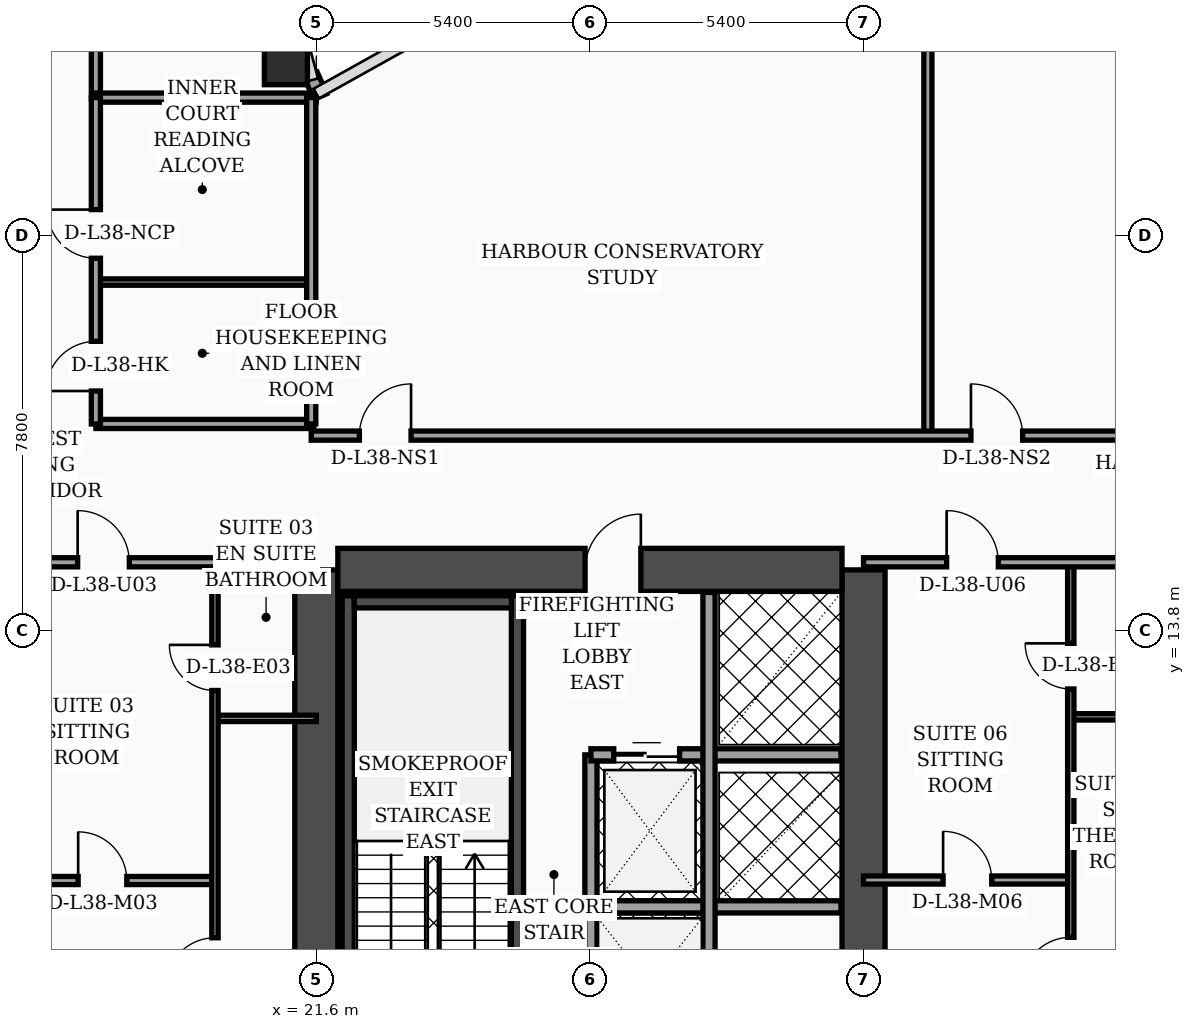
"""IFC4 building model, lengths in metres.
Left out: names, types, materials, properties, quantities, classifications, styles, units other than length and angle.
Written with IfcOpenShell. Run it as: python <this file> out.ifc"""

import sys

from ifc_helpers import new_model, si_unit, direction, frame, frame_2d, origin, origin_2d, place, context, subcontext, project, spatial, rectangle, hollow_rectangle, extrude, element, fill, save


model = new_model("IFC4")
c1 = context("Model", 3, precision=1e-05, world=origin(), true_north=direction((0.0, 1.0)))
c2 = subcontext(c1, "Body", "Model", "MODEL_VIEW")
j1 = project(units=[si_unit("LENGTHUNIT", "METRE"), si_unit("PLANEANGLEUNIT", "RADIAN")], contexts=[c1])
p1 = place(None, origin())
s1 = spatial("IfcSite", under=j1, at=p1, CompositionType="ELEMENT")
p2 = place(p1, origin())
s2 = spatial("IfcBuilding", under=s1, at=p2, CompositionType="ELEMENT")
p3 = place(p2, frame((0.0, 0.0, 156.1)))
s3 = spatial("IfcBuildingStorey", under=s2, at=p3, CompositionType="ELEMENT", Elevation=156.1)
for number, where, z_axis, x_axis in (
    (1, (21.6, 4.6, 0.0), (0.0, 0.0, 1.0), (0.0, 1.0, 0.0)),
    (2, (32.4, 4.6, 0.0), (0.0, 0.0, 1.0), (0.0, 1.0, 0.0)),
):
    element("IfcWall", number, at=place(p3, frame(where, z_axis=z_axis, x_axis=x_axis)), inside=s3, PredefinedType="SHEAR", context=c2, shape_type="SweptSolid", body=[
        extrude(rectangle(XDim=10.4, YDim=0.85, at=frame_2d((5.2, 0.0))), origin(), (0.0, 0.0, 1.0), 3.56),
    ])
p4 = place(p3, frame((22.025, 15.0, 0.0), z_axis=(0.0, 0.0, 1.0), x_axis=(1.0, 0.0, 0.0)))
e3 = element("IfcWall", 3, at=p4, inside=s3, PredefinedType="SHEAR", context=c2, shape_type="SweptSolid", body=[
    extrude(rectangle(XDim=9.95, YDim=0.85, at=frame_2d((4.975, 0.0))), origin(), (0.0, 0.0, 1.0), 3.56),
])
p5 = place(p4, frame((4.88, 0.0, 0.0)))
e4 = element("IfcOpeningElement", 4, at=p5, cuts=e3, PredefinedType="OPENING", context=c2, shape_type="SweptSolid", body=[
    extrude(rectangle(XDim=1.1, YDim=2.2, at=frame_2d((0.55, 1.1))), frame((0.0, 0.435, 0.0), z_axis=(0.0, -1.0, 0.0), x_axis=(1.0, 0.0, 0.0)), (0.0, 0.0, 1.0), 0.87),
])
p6 = place(p3, frame((22.23, 5.025, 0.0), z_axis=(0.0, 0.0, 1.0), x_axis=(0.0, 1.0, 0.0)))
e5 = element("IfcWall", 5, at=p6, inside=s3, PredefinedType="SOLIDWALL", context=c2, shape_type="SweptSolid", body=[
    extrude(rectangle(XDim=9.465, YDim=0.24, at=frame_2d((4.732, 0.0))), origin(), (0.0, 0.0, 1.0), 3.56),
])
p7 = place(p3, frame((25.57, 5.025, 0.0), z_axis=(0.0, 0.0, 1.0), x_axis=(0.0, 1.0, 0.0)))
e6 = element("IfcWall", 6, at=p7, inside=s3, PredefinedType="SOLIDWALL", context=c2, shape_type="SweptSolid", body=[
    extrude(rectangle(XDim=9.465, YDim=0.24, at=frame_2d((4.732, 0.0))), origin(), (0.0, 0.0, 1.0), 3.56),
])
p8 = place(p7, frame((0.35, 0.0, 0.0)))
e7 = element("IfcOpeningElement", 7, at=p8, cuts=e6, PredefinedType="OPENING", context=c2, shape_type="SweptSolid", body=[
    extrude(rectangle(XDim=1.15, YDim=2.2, at=frame_2d((0.575, 1.1))), frame((0.0, 0.13, 0.0), z_axis=(0.0, -1.0, 0.0), x_axis=(1.0, 0.0, 0.0)), (0.0, 0.0, 1.0), 0.26),
])
p9 = place(p3, frame((22.35, 14.37, 0.0), z_axis=(0.0, 0.0, 1.0), x_axis=(1.0, 0.0, 0.0)))
e8 = element("IfcWall", 8, at=p9, inside=s3, PredefinedType="SOLIDWALL", context=c2, shape_type="SweptSolid", body=[
    extrude(rectangle(XDim=3.1, YDim=0.24, at=frame_2d((1.55, 0.0))), origin(), (0.0, 0.0, 1.0), 3.56),
])
p10 = place(p3, frame((21.0, 25.0, 0.0), z_axis=(0.0, 0.0, 1.0), x_axis=(1.0, 0.0, 0.0)))
e9 = element("IfcColumn", 9, at=p10, inside=s3, PredefinedType="COLUMN", context=c2, shape_type="SweptSolid", body=[
    extrude(hollow_rectangle(XDim=0.85, YDim=0.85, WallThickness=0.036, at=origin_2d()), origin(), (0.0, 0.0, 1.0), 3.56),
])
p11 = place(p3, frame((21.68, 24.34, 0.0), z_axis=(0.0, 0.0, 1.0), x_axis=(-0.40758134973, 0.913168901875, 0.0)))
e10 = element("IfcWall", 10, at=p11, inside=s3, PredefinedType="SOLIDWALL", context=c2, shape_type="SweptSolid", body=[
    extrude(rectangle(XDim=0.471, YDim=0.28, at=frame_2d((0.235, 0.0))), origin(), (0.0, 0.0, 1.0), 3.56),
])
p12 = place(p3, frame((27.02, 5.045, 0.0), z_axis=(0.0, 0.0, 1.0), x_axis=(0.0, 1.0, 0.0)))
e11 = element("IfcWall", 11, at=p12, inside=s3, PredefinedType="SOLIDWALL", context=c2, shape_type="SweptSolid", body=[
    extrude(rectangle(XDim=6.305, YDim=0.24, at=frame_2d((3.153, 0.0))), origin(), (0.0, 0.0, 1.0), 3.56),
])
p13 = place(p3, frame((27.02, 11.35, 0.0), z_axis=(0.0, 0.0, 1.0), x_axis=(1.0, 0.0, 0.0)))
e12 = element("IfcWall", 12, at=p13, inside=s3, PredefinedType="SOLIDWALL", context=c2, shape_type="SweptSolid", body=[
    extrude(rectangle(XDim=4.935, YDim=0.24, at=frame_2d((2.468, 0.0))), origin(), (0.0, 0.0, 1.0), 3.56),
])
p14 = place(p13, frame((0.45, 0.0, 0.0)))
e13 = element("IfcOpeningElement", 13, at=p14, cuts=e12, PredefinedType="OPENING", context=c2, shape_type="SweptSolid", body=[
    extrude(rectangle(XDim=1.3, YDim=2.35, at=frame_2d((0.65, 1.175))), frame((0.0, 0.13, 0.0), z_axis=(0.0, -1.0, 0.0), x_axis=(1.0, 0.0, 0.0)), (0.0, 0.0, 1.0), 0.26),
])
p15 = place(p3, frame((27.02, 8.35, 0.0), z_axis=(0.0, 0.0, 1.0), x_axis=(1.0, 0.0, 0.0)))
e14 = element("IfcWall", 14, at=p15, inside=s3, PredefinedType="SOLIDWALL", context=c2, shape_type="SweptSolid", body=[
    extrude(rectangle(XDim=4.935, YDim=0.24, at=frame_2d((2.468, 0.0))), origin(), (0.0, 0.0, 1.0), 3.56),
])
p16 = place(p3, frame((29.35, 5.045, 0.0), z_axis=(0.0, 0.0, 1.0), x_axis=(0.0, 1.0, 0.0)))
e15 = element("IfcWall", 15, at=p16, inside=s3, PredefinedType="SOLIDWALL", context=c2, shape_type="SweptSolid", body=[
    extrude(rectangle(XDim=9.51, YDim=0.24, at=frame_2d((4.755, 0.0))), origin(), (0.0, 0.0, 1.0), 3.56),
])
p17 = place(p16, frame((0.55, 0.0, 0.0)))
e16 = element("IfcOpeningElement", 16, at=p17, cuts=e15, PredefinedType="OPENING", context=c2, shape_type="SweptSolid", body=[
    extrude(rectangle(XDim=1.3, YDim=2.35, at=frame_2d((0.65, 1.175))), frame((0.0, 0.13, 0.0), z_axis=(0.0, -1.0, 0.0), x_axis=(1.0, 0.0, 0.0)), (0.0, 0.0, 1.0), 0.26),
])
p18 = place(p3, frame((19.6, 12.07, 0.0), z_axis=(0.0, 0.0, 1.0), x_axis=(1.0, 0.0, 0.0)))
e17 = element("IfcWall", 17, at=p18, inside=s3, PredefinedType="PARTITIONING", context=c2, shape_type="SweptSolid", body=[
    extrude(rectangle(XDim=2.0, YDim=0.125, at=frame_2d((1.0, 0.0))), origin(), (0.0, 0.0, 1.0), 3.56),
])
p19 = place(p3, frame((15.15, 8.87, 0.0), z_axis=(0.0, 0.0, 1.0), x_axis=(1.0, 0.0, 0.0)))
e18 = element("IfcWall", 18, at=p19, inside=s3, PredefinedType="PARTITIONING", context=c2, shape_type="SweptSolid", body=[
    extrude(rectangle(XDim=4.45, YDim=0.16, at=frame_2d((2.225, 0.0))), origin(), (0.0, 0.0, 1.0), 3.56),
])
p20 = place(p19, frame((1.75, 0.0, 0.0)))
e19 = element("IfcOpeningElement", 19, at=p20, cuts=e18, PredefinedType="OPENING", context=c2, shape_type="SweptSolid", body=[
    extrude(rectangle(XDim=0.96, YDim=2.2, at=frame_2d((0.48, 1.1))), frame((0.0, 0.09, 0.0), z_axis=(0.0, -1.0, 0.0), x_axis=(1.0, 0.0, 0.0)), (0.0, 0.0, 1.0), 0.18),
])
p21 = place(p3, frame((19.6, 2.44, 0.0), z_axis=(0.0, 0.0, 1.0), x_axis=(0.0, 1.0, 0.0)))
e20 = element("IfcWall", 20, at=p21, inside=s3, PredefinedType="PARTITIONING", context=c2, shape_type="SweptSolid", body=[
    extrude(rectangle(XDim=12.71, YDim=0.125, at=frame_2d((6.355, 0.0))), origin(), (0.0, 0.0, 1.0), 2.49),
])
p22 = place(p21, frame((4.34, 0.0, 0.0)))
e21 = element("IfcOpeningElement", 21, at=p22, cuts=e20, PredefinedType="OPENING", context=c2, shape_type="SweptSolid", body=[
    extrude(rectangle(XDim=0.96, YDim=2.2, at=frame_2d((0.48, 1.1))), frame((0.0, 0.073, 0.0), z_axis=(0.0, -1.0, 0.0), x_axis=(1.0, 0.0, 0.0)), (0.0, 0.0, 1.0), 0.145),
])
p23 = place(p21, frame((10.18, 0.0, 0.0)))
e22 = element("IfcOpeningElement", 22, at=p23, cuts=e20, PredefinedType="OPENING", context=c2, shape_type="SweptSolid", body=[
    extrude(rectangle(XDim=0.9, YDim=2.15, at=frame_2d((0.45, 1.075))), frame((0.0, 0.073, 0.0), z_axis=(0.0, -1.0, 0.0), x_axis=(1.0, 0.0, 0.0)), (0.0, 0.0, 1.0), 0.145),
])
p24 = place(p3, frame((15.15, 15.15, 0.0), z_axis=(0.0, 0.0, 1.0), x_axis=(1.0, 0.0, 0.0)))
e23 = element("IfcWall", 23, at=p24, inside=s3, PredefinedType="PARTITIONING", context=c2, shape_type="SweptSolid", body=[
    extrude(rectangle(XDim=6.45, YDim=0.18, at=frame_2d((3.225, 0.0))), origin(), (0.0, 0.0, 1.0), 2.49),
])
p25 = place(p24, frame((1.74, 0.0, 0.0)))
e24 = element("IfcOpeningElement", 24, at=p25, cuts=e23, PredefinedType="OPENING", context=c2, shape_type="SweptSolid", body=[
    extrude(rectangle(XDim=1.02, YDim=2.2, at=frame_2d((0.51, 1.1))), frame((0.0, 0.1, 0.0), z_axis=(0.0, -1.0, 0.0), x_axis=(1.0, 0.0, 0.0)), (0.0, 0.0, 1.0), 0.2),
])
p26 = place(p3, frame((17.25, 24.3, 0.0), z_axis=(0.0, 0.0, 1.0), x_axis=(0.0, 1.0, 0.0)))
e25 = element("IfcWall", 25, at=p26, inside=s3, PredefinedType="PARTITIONING", context=c2, shape_type="SweptSolid", body=[
    extrude(rectangle(XDim=17.65, YDim=0.18, at=frame_2d((8.825, 0.0))), origin(), (0.0, 0.0, 1.0), 2.94),
])
p27 = place(p3, frame((17.25, 17.88, 0.0), z_axis=(0.0, 0.0, 1.0), x_axis=(1.0, 0.0, 0.0)))
e26 = element("IfcWall", 26, at=p27, inside=s3, PredefinedType="PARTITIONING", context=c2, shape_type="SweptSolid", body=[
    extrude(rectangle(XDim=4.3, YDim=0.18, at=frame_2d((2.15, 0.0))), origin(), (0.0, 0.0, 1.0), 3.56),
])
p28 = place(p3, frame((17.25, 20.68, 0.0), z_axis=(0.0, 0.0, 1.0), x_axis=(1.0, 0.0, 0.0)))
e27 = element("IfcWall", 27, at=p28, inside=s3, PredefinedType="PARTITIONING", context=c2, shape_type="SweptSolid", body=[
    extrude(rectangle(XDim=4.3, YDim=0.125, at=frame_2d((2.15, 0.0))), origin(), (0.0, 0.0, 1.0), 3.56),
])
p29 = place(p3, frame((17.25, 24.32, 0.0), z_axis=(0.0, 0.0, 1.0), x_axis=(1.0, 0.0, 0.0)))
e28 = element("IfcWall", 28, at=p29, inside=s3, PredefinedType="PARTITIONING", context=c2, shape_type="SweptSolid", body=[
    extrude(rectangle(XDim=4.35, YDim=0.18, at=frame_2d((2.175, 0.0))), origin(), (0.0, 0.0, 1.0), 3.56),
])
p30 = place(p3, frame((21.5, 17.88, 0.0), z_axis=(0.0, 0.0, 1.0), x_axis=(0.0, 1.0, 0.0)))
e29 = element("IfcWall", 29, at=p30, inside=s3, PredefinedType="PARTITIONING", context=c2, shape_type="SweptSolid", body=[
    extrude(rectangle(XDim=6.44, YDim=0.18, at=frame_2d((3.22, 0.0))), origin(), (0.0, 0.0, 1.0), 3.09),
])
p31 = place(p3, frame((17.25, 17.88, 0.0), z_axis=(0.0, 0.0, 1.0), x_axis=(0.0, 1.0, 0.0)))
e30 = element("IfcWall", 30, at=p31, inside=s3, PredefinedType="PARTITIONING", context=c2, shape_type="SweptSolid", body=[
    extrude(rectangle(XDim=6.44, YDim=0.18, at=frame_2d((3.22, 0.0))), origin(), (0.0, 0.0, 1.0), 3.09),
])
p32 = place(p31, frame((0.65, 0.0, 0.0)))
e31 = element("IfcOpeningElement", 31, at=p32, cuts=e30, PredefinedType="OPENING", context=c2, shape_type="SweptSolid", body=[
    extrude(rectangle(XDim=0.98, YDim=2.15, at=frame_2d((0.49, 1.075))), frame((0.0, 0.1, 0.0), z_axis=(0.0, -1.0, 0.0), x_axis=(1.0, 0.0, 0.0)), (0.0, 0.0, 1.0), 0.2),
])
p33 = place(p31, frame((3.27, 0.0, 0.0)))
e32 = element("IfcOpeningElement", 32, at=p33, cuts=e30, PredefinedType="OPENING", context=c2, shape_type="SweptSolid", body=[
    extrude(rectangle(XDim=0.96, YDim=2.2, at=frame_2d((0.48, 1.1))), frame((0.0, 0.1, 0.0), z_axis=(0.0, -1.0, 0.0), x_axis=(1.0, 0.0, 0.0)), (0.0, 0.0, 1.0), 0.2),
])
p34 = place(p3, frame((36.49, 12.1, 0.0), z_axis=(0.0, 0.0, 1.0), x_axis=(1.0, 0.0, 0.0)))
e33 = element("IfcWall", 33, at=p34, inside=s3, PredefinedType="PARTITIONING", context=c2, shape_type="SweptSolid", body=[
    extrude(rectangle(XDim=1.93, YDim=0.125, at=frame_2d((0.965, 0.0))), origin(), (0.0, 0.0, 1.0), 3.56),
])
p35 = place(p3, frame((32.4, 8.88, 0.0), z_axis=(0.0, 0.0, 1.0), x_axis=(1.0, 0.0, 0.0)))
e34 = element("IfcWall", 34, at=p35, inside=s3, PredefinedType="PARTITIONING", context=c2, shape_type="SweptSolid", body=[
    extrude(rectangle(XDim=4.09, YDim=0.16, at=frame_2d((2.045, 0.0))), origin(), (0.0, 0.0, 1.0), 2.94),
])
p36 = place(p35, frame((1.57, 0.0, 0.0)))
e35 = element("IfcOpeningElement", 35, at=p36, cuts=e34, PredefinedType="OPENING", context=c2, shape_type="SweptSolid", body=[
    extrude(rectangle(XDim=0.96, YDim=2.2, at=frame_2d((0.48, 1.1))), frame((0.0, 0.09, 0.0), z_axis=(0.0, -1.0, 0.0), x_axis=(1.0, 0.0, 0.0)), (0.0, 0.0, 1.0), 0.18),
])
p37 = place(p3, frame((36.49, 2.44, 0.0), z_axis=(0.0, 0.0, 1.0), x_axis=(0.0, 1.0, 0.0)))
e36 = element("IfcWall", 36, at=p37, inside=s3, PredefinedType="PARTITIONING", context=c2, shape_type="SweptSolid", body=[
    extrude(rectangle(XDim=12.71, YDim=0.125, at=frame_2d((6.355, 0.0))), origin(), (0.0, 0.0, 1.0), 2.94),
])
p38 = place(p37, frame((4.35, 0.0, 0.0)))
e37 = element("IfcOpeningElement", 37, at=p38, cuts=e36, PredefinedType="OPENING", context=c2, shape_type="SweptSolid", body=[
    extrude(rectangle(XDim=0.96, YDim=2.2, at=frame_2d((0.48, 1.1))), frame((0.0, 0.073, 0.0), z_axis=(0.0, -1.0, 0.0), x_axis=(1.0, 0.0, 0.0)), (0.0, 0.0, 1.0), 0.145),
])
p39 = place(p37, frame((10.21, 0.0, 0.0)))
e38 = element("IfcOpeningElement", 38, at=p39, cuts=e36, PredefinedType="OPENING", context=c2, shape_type="SweptSolid", body=[
    extrude(rectangle(XDim=0.9, YDim=2.15, at=frame_2d((0.45, 1.075))), frame((0.0, 0.073, 0.0), z_axis=(0.0, -1.0, 0.0), x_axis=(1.0, 0.0, 0.0)), (0.0, 0.0, 1.0), 0.145),
])
p40 = place(p3, frame((32.4, 15.15, 0.0), z_axis=(0.0, 0.0, 1.0), x_axis=(1.0, 0.0, 0.0)))
e39 = element("IfcWall", 39, at=p40, inside=s3, PredefinedType="PARTITIONING", context=c2, shape_type="SweptSolid", body=[
    extrude(rectangle(XDim=20.2, YDim=0.18, at=frame_2d((10.1, 0.0))), origin(), (0.0, 0.0, 1.0), 2.94),
])
p41 = place(p40, frame((1.64, 0.0, 0.0)))
e40 = element("IfcOpeningElement", 40, at=p41, cuts=e39, PredefinedType="OPENING", context=c2, shape_type="SweptSolid", body=[
    extrude(rectangle(XDim=1.02, YDim=2.2, at=frame_2d((0.51, 1.1))), frame((0.0, 0.1, 0.0), z_axis=(0.0, -1.0, 0.0), x_axis=(1.0, 0.0, 0.0)), (0.0, 0.0, 1.0), 0.2),
])
p42 = place(p40, frame((8.2, 0.0, 0.0)))
e41 = element("IfcOpeningElement", 41, at=p42, cuts=e39, PredefinedType="OPENING", context=c2, shape_type="SweptSolid", body=[
    extrude(rectangle(XDim=1.02, YDim=2.2, at=frame_2d((0.51, 1.1))), frame((0.0, 0.1, 0.0), z_axis=(0.0, -1.0, 0.0), x_axis=(1.0, 0.0, 0.0)), (0.0, 0.0, 1.0), 0.2),
])
p43 = place(p40, frame((15.39, 0.0, 0.0)))
e42 = element("IfcOpeningElement", 42, at=p43, cuts=e39, PredefinedType="OPENING", context=c2, shape_type="SweptSolid", body=[
    extrude(rectangle(XDim=1.02, YDim=2.2, at=frame_2d((0.51, 1.1))), frame((0.0, 0.1, 0.0), z_axis=(0.0, -1.0, 0.0), x_axis=(1.0, 0.0, 0.0)), (0.0, 0.0, 1.0), 0.2),
])
p44 = place(p3, frame((33.67, 17.65, 0.0), z_axis=(0.0, 0.0, 1.0), x_axis=(0.0, 1.0, 0.0)))
e43 = element("IfcWall", 43, at=p44, inside=s3, PredefinedType="PARTITIONING", context=c2, shape_type="SweptSolid", body=[
    extrude(rectangle(XDim=13.56, YDim=0.16, at=frame_2d((6.78, 0.0))), origin(), (0.0, 0.0, 1.0), 2.94),
])
p45 = place(p3, frame((21.5, 17.65, 0.0), z_axis=(0.0, 0.0, 1.0), x_axis=(1.0, 0.0, 0.0)))
e44 = element("IfcWall", 44, at=p45, inside=s3, PredefinedType="PARTITIONING", context=c2, shape_type="SweptSolid", body=[
    extrude(rectangle(XDim=24.25, YDim=0.18, at=frame_2d((12.125, 0.0))), origin(), (0.0, 0.0, 1.0), 2.94),
])
p46 = place(p45, frame((0.95, 0.0, 0.0)))
e45 = element("IfcOpeningElement", 45, at=p46, cuts=e44, PredefinedType="OPENING", context=c2, shape_type="SweptSolid", body=[
    extrude(rectangle(XDim=1.02, YDim=2.2, at=frame_2d((0.51, 1.1))), frame((0.0, 0.1, 0.0), z_axis=(0.0, -1.0, 0.0), x_axis=(1.0, 0.0, 0.0)), (0.0, 0.0, 1.0), 0.2),
])
p47 = place(p45, frame((13.02, 0.0, 0.0)))
e46 = element("IfcOpeningElement", 46, at=p47, cuts=e44, PredefinedType="OPENING", context=c2, shape_type="SweptSolid", body=[
    extrude(rectangle(XDim=1.02, YDim=2.2, at=frame_2d((0.51, 1.1))), frame((0.0, 0.1, 0.0), z_axis=(0.0, -1.0, 0.0), x_axis=(1.0, 0.0, 0.0)), (0.0, 0.0, 1.0), 0.2),
])
p48 = place(p14, origin())
e47 = element("IfcDoor", 47, at=p48, inside=s3, OperationType="DOUBLE_DOOR_SLIDING", PredefinedType="DOOR", context=c2, shape_type="SweptSolid", body=[
    extrude(rectangle(XDim=1.3, YDim=2.35, at=frame_2d((0.65, 1.175))), frame((0.0, 0.025, 0.0), z_axis=(0.0, -1.0, 0.0), x_axis=(1.0, 0.0, 0.0)), (0.0, 0.0, 1.0), 0.05),
])
fill(e13, e47)
p49 = place(p20, origin())
e48 = element("IfcDoor", 48, at=p49, inside=s3, OperationType="SINGLE_SWING_LEFT", PredefinedType="DOOR", context=c2, shape_type="SweptSolid", body=[
    extrude(rectangle(XDim=0.96, YDim=2.2, at=frame_2d((0.48, 1.1))), frame((0.0, 0.025, 0.0), z_axis=(0.0, -1.0, 0.0), x_axis=(1.0, 0.0, 0.0)), (0.0, 0.0, 1.0), 0.05),
])
fill(e19, e48)
p50 = place(p22, origin())
e49 = element("IfcDoor", 49, at=p50, inside=s3, OperationType="SINGLE_SWING_LEFT", PredefinedType="DOOR", context=c2, shape_type="SweptSolid", body=[
    extrude(rectangle(XDim=0.96, YDim=2.2, at=frame_2d((0.48, 1.1))), frame((0.0, 0.025, 0.0), z_axis=(0.0, -1.0, 0.0), x_axis=(1.0, 0.0, 0.0)), (0.0, 0.0, 1.0), 0.05),
])
fill(e21, e49)
p51 = place(p23, origin())
e50 = element("IfcDoor", 50, at=p51, inside=s3, OperationType="SINGLE_SWING_RIGHT", PredefinedType="DOOR", context=c2, shape_type="SweptSolid", body=[
    extrude(rectangle(XDim=0.9, YDim=2.15, at=frame_2d((0.45, 1.075))), frame((0.0, 0.025, 0.0), z_axis=(0.0, -1.0, 0.0), x_axis=(1.0, 0.0, 0.0)), (0.0, 0.0, 1.0), 0.05),
])
fill(e22, e50)
p52 = place(p25, origin())
e51 = element("IfcDoor", 51, at=p52, inside=s3, OperationType="SINGLE_SWING_LEFT", PredefinedType="DOOR", context=c2, shape_type="SweptSolid", body=[
    extrude(rectangle(XDim=1.02, YDim=2.2, at=frame_2d((0.51, 1.1))), frame((0.0, 0.025, 0.0), z_axis=(0.0, -1.0, 0.0), x_axis=(1.0, 0.0, 0.0)), (0.0, 0.0, 1.0), 0.05),
])
fill(e24, e51)
p53 = place(p32, origin())
e52 = element("IfcDoor", 52, at=p53, inside=s3, OperationType="SINGLE_SWING_LEFT", PredefinedType="DOOR", context=c2, shape_type="SweptSolid", body=[
    extrude(rectangle(XDim=0.98, YDim=2.15, at=frame_2d((0.49, 1.075))), frame((0.0, 0.025, 0.0), z_axis=(0.0, -1.0, 0.0), x_axis=(1.0, 0.0, 0.0)), (0.0, 0.0, 1.0), 0.05),
])
fill(e31, e52)
p54 = place(p33, origin())
e53 = element("IfcDoor", 53, at=p54, inside=s3, OperationType="SINGLE_SWING_RIGHT", PredefinedType="DOOR", context=c2, shape_type="SweptSolid", body=[
    extrude(rectangle(XDim=0.96, YDim=2.2, at=frame_2d((0.48, 1.1))), frame((0.0, 0.025, 0.0), z_axis=(0.0, -1.0, 0.0), x_axis=(1.0, 0.0, 0.0)), (0.0, 0.0, 1.0), 0.05),
])
fill(e32, e53)
p55 = place(p36, origin())
e54 = element("IfcDoor", 54, at=p55, inside=s3, OperationType="SINGLE_SWING_LEFT", PredefinedType="DOOR", context=c2, shape_type="SweptSolid", body=[
    extrude(rectangle(XDim=0.96, YDim=2.2, at=frame_2d((0.48, 1.1))), frame((0.0, 0.025, 0.0), z_axis=(0.0, -1.0, 0.0), x_axis=(1.0, 0.0, 0.0)), (0.0, 0.0, 1.0), 0.05),
])
fill(e35, e54)
p56 = place(p38, origin())
e55 = element("IfcDoor", 55, at=p56, inside=s3, OperationType="SINGLE_SWING_LEFT", PredefinedType="DOOR", context=c2, shape_type="SweptSolid", body=[
    extrude(rectangle(XDim=0.96, YDim=2.2, at=frame_2d((0.48, 1.1))), frame((0.0, 0.025, 0.0), z_axis=(0.0, -1.0, 0.0), x_axis=(1.0, 0.0, 0.0)), (0.0, 0.0, 1.0), 0.05),
])
fill(e37, e55)
p57 = place(p39, origin())
e56 = element("IfcDoor", 56, at=p57, inside=s3, OperationType="SINGLE_SWING_RIGHT", PredefinedType="DOOR", context=c2, shape_type="SweptSolid", body=[
    extrude(rectangle(XDim=0.9, YDim=2.15, at=frame_2d((0.45, 1.075))), frame((0.0, 0.025, 0.0), z_axis=(0.0, -1.0, 0.0), x_axis=(1.0, 0.0, 0.0)), (0.0, 0.0, 1.0), 0.05),
])
fill(e38, e56)
p58 = place(p41, origin())
e57 = element("IfcDoor", 57, at=p58, inside=s3, OperationType="SINGLE_SWING_LEFT", PredefinedType="DOOR", context=c2, shape_type="SweptSolid", body=[
    extrude(rectangle(XDim=1.02, YDim=2.2, at=frame_2d((0.51, 1.1))), frame((0.0, 0.025, 0.0), z_axis=(0.0, -1.0, 0.0), x_axis=(1.0, 0.0, 0.0)), (0.0, 0.0, 1.0), 0.05),
])
fill(e40, e57)
p59 = place(p46, origin())
e58 = element("IfcDoor", 58, at=p59, inside=s3, OperationType="SINGLE_SWING_RIGHT", PredefinedType="DOOR", context=c2, shape_type="SweptSolid", body=[
    extrude(rectangle(XDim=1.02, YDim=2.2, at=frame_2d((0.51, 1.1))), frame((0.0, 0.025, 0.0), z_axis=(0.0, -1.0, 0.0), x_axis=(1.0, 0.0, 0.0)), (0.0, 0.0, 1.0), 0.05),
])
fill(e45, e58)
p60 = place(p47, origin())
e59 = element("IfcDoor", 59, at=p60, inside=s3, OperationType="SINGLE_SWING_LEFT", PredefinedType="DOOR", context=c2, shape_type="SweptSolid", body=[
    extrude(rectangle(XDim=1.02, YDim=2.2, at=frame_2d((0.51, 1.1))), frame((0.0, 0.025, 0.0), z_axis=(0.0, -1.0, 0.0), x_axis=(1.0, 0.0, 0.0)), (0.0, 0.0, 1.0), 0.05),
])
fill(e46, e59)
p61 = place(p5, origin())
e60 = element("IfcDoor", 60, at=p61, inside=s3, OperationType="SINGLE_SWING_RIGHT", PredefinedType="DOOR", context=c2, shape_type="SweptSolid", body=[
    extrude(rectangle(XDim=1.1, YDim=2.2, at=frame_2d((0.55, 1.1))), frame((0.0, 0.025, 0.0), z_axis=(0.0, -1.0, 0.0), x_axis=(1.0, 0.0, 0.0)), (0.0, 0.0, 1.0), 0.05),
])
fill(e4, e60)
save(model, sys.argv[1])
